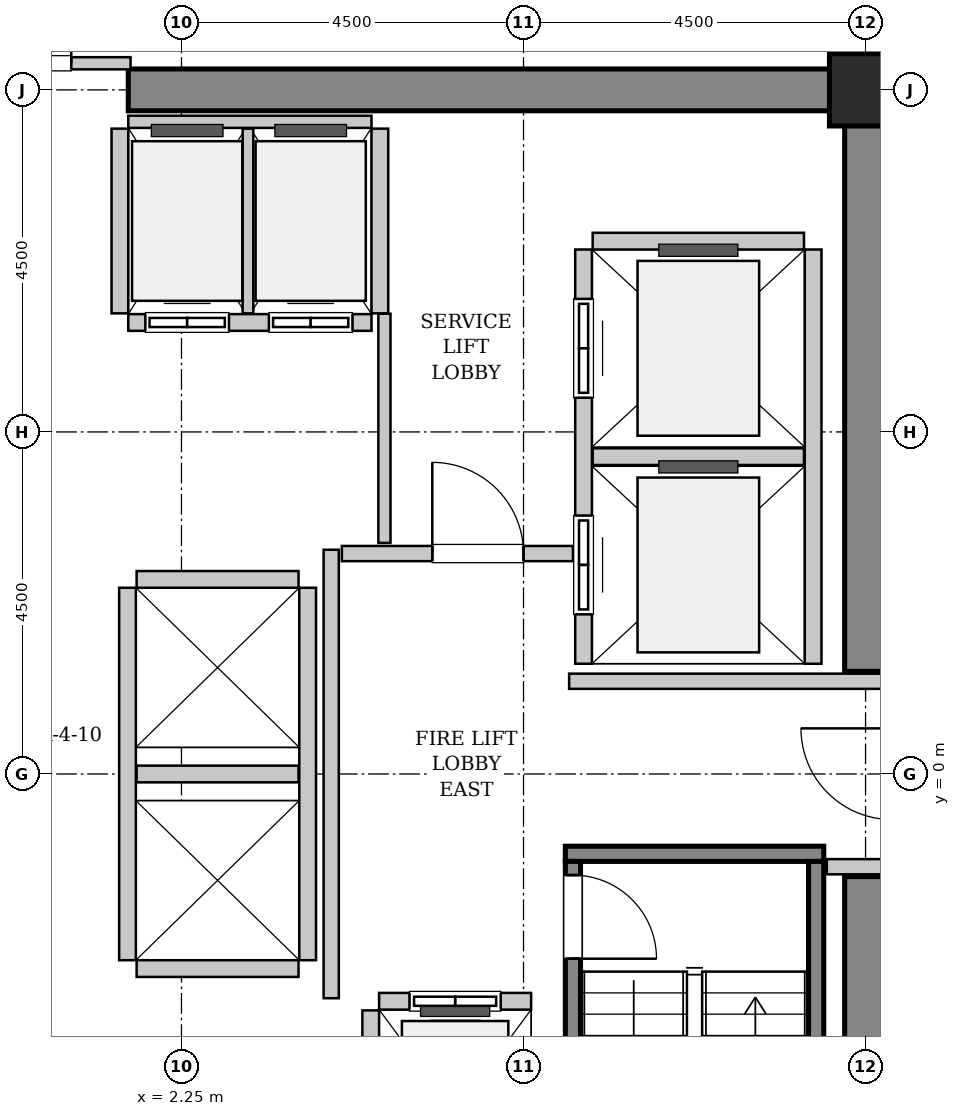
"""IFC4 building model, lengths in metres.
Left out: names, types, materials, properties, quantities, classifications, styles, units other than length and angle.
Written with IfcOpenShell. Run it as: python <this file> out.ifc"""

import sys

from ifc_helpers import new_model, si_unit, direction, frame, frame_2d, origin, origin_2d, place, context, subcontext, project, spatial, rectangle, hollow_rectangle, extrude, source, transform, mapped, element, fill, save


model = new_model("IFC4")
c1 = context("Model", 3, precision=1e-05, world=origin(), true_north=direction((0.0, 1.0)))
c2 = subcontext(c1, "Body", "Model", "MODEL_VIEW")
j1 = project(units=[si_unit("LENGTHUNIT", "METRE"), si_unit("PLANEANGLEUNIT", "RADIAN")], contexts=[c1])
p1 = place(None, origin())
s1 = spatial("IfcSite", under=j1, at=p1, CompositionType="ELEMENT")
p2 = place(p1, origin())
s2 = spatial("IfcBuilding", under=s1, at=p2, CompositionType="ELEMENT")
p3 = place(p2, frame((0.0, 0.0, 113.6)))
s3 = spatial("IfcBuildingStorey", under=s2, at=p3, CompositionType="ELEMENT", Elevation=113.6)
m1 = source(origin(), c2, "Body", "SweptSolid", [
    extrude(rectangle(XDim=9.975, YDim=0.55, at=frame_2d((4.987, 0.0))), origin(), (0.0, 0.0, 1.0), 3.8),
])
p4 = place(p3, frame((1.55, 9.0, 0.0), z_axis=(0.0, 0.0, 1.0), x_axis=(1.0, 0.0, 0.0)))
e1 = element("IfcWall", 1, at=p4, inside=s3, PredefinedType="SHEAR", context=c2, shape_type="MappedRepresentation", body=[
    mapped(m1, transform((0.0, 0.0, 0.0), x_axis=(1.0, 0.0, 0.0), y_axis=(0.0, 1.0, 0.0), z_axis=(0.0, 0.0, 1.0), scale=1.0)),
])
m2 = source(origin(), c2, "Body", "SweptSolid", [
    extrude(rectangle(XDim=7.375, YDim=0.55, at=frame_2d((3.688, 0.0))), origin(), (0.0, 0.0, 1.0), 3.8),
])
for number, where, z_axis, x_axis in (
    (2, (11.25, -8.725, 0.0), (0.0, 0.0, 1.0), (0.0, 1.0, 0.0)),
    (3, (11.25, 1.35, 0.0), (0.0, 0.0, 1.0), (0.0, 1.0, 0.0)),
):
    element("IfcWall", number, at=place(p3, frame(where, z_axis=z_axis, x_axis=x_axis)), inside=s3, PredefinedType="SHEAR", context=c2, shape_type="MappedRepresentation", body=[
        mapped(m2, transform((0.0, 0.0, 0.0), x_axis=(1.0, 0.0, 0.0), y_axis=(0.0, 1.0, 0.0), z_axis=(0.0, 0.0, 1.0), scale=1.0)),
    ])
m3 = source(origin(), c2, "Body", "SweptSolid", [
    extrude(hollow_rectangle(XDim=0.95, YDim=0.95, WallThickness=0.045, InnerFilletRadius=0.045, OuterFilletRadius=0.09, at=origin_2d()), origin(), (0.0, 0.0, 1.0), 3.8),
])
p5 = place(p3, frame((11.25, 9.0, 0.0), z_axis=(0.0, 0.0, 1.0), x_axis=(1.0, 0.0, 0.0)))
e4 = element("IfcColumn", 4, at=p5, inside=s3, PredefinedType="COLUMN", context=c2, shape_type="MappedRepresentation", body=[
    mapped(m3, transform((0.0, 0.0, 0.0), x_axis=(1.0, 0.0, 0.0), y_axis=(0.0, 1.0, 0.0), z_axis=(0.0, 0.0, 1.0), scale=1.0)),
])
m4 = source(origin(), c2, "Body", "SweptSolid", [
    extrude(rectangle(XDim=3.4, YDim=0.2, at=frame_2d((1.7, 0.0))), origin(), (0.0, 0.0, 1.0), 3.8),
])
p6 = place(p3, frame((7.3, -1.05, 0.0), z_axis=(0.0, 0.0, 1.0), x_axis=(1.0, 0.0, 0.0)))
e5 = element("IfcWall", 5, at=p6, inside=s3, PredefinedType="SOLIDWALL", context=c2, shape_type="MappedRepresentation", body=[
    mapped(m4, transform((0.0, 0.0, 0.0), x_axis=(1.0, 0.0, 0.0), y_axis=(0.0, 1.0, 0.0), z_axis=(0.0, 0.0, 1.0), scale=1.0)),
])
m5 = source(origin(), c2, "Body", "SweptSolid", [
    extrude(rectangle(XDim=7.1, YDim=0.2, at=frame_2d((3.55, 0.0))), origin(), (0.0, 0.0, 1.0), 3.8),
])
p7 = place(p3, frame((7.4, -1.15, 0.0), z_axis=(0.0, 0.0, 1.0), x_axis=(0.0, -1.0, 0.0)))
e6 = element("IfcWall", 6, at=p7, inside=s3, PredefinedType="SOLIDWALL", context=c2, shape_type="MappedRepresentation", body=[
    mapped(m5, transform((0.0, 0.0, 0.0), x_axis=(1.0, 0.0, 0.0), y_axis=(0.0, 1.0, 0.0), z_axis=(0.0, 0.0, 1.0), scale=1.0)),
])
p8 = place(p7, frame((0.18, 0.0, 0.0)))
e7 = element("IfcOpeningElement", 7, at=p8, cuts=e6, PredefinedType="OPENING", context=c2, shape_type="SweptSolid", body=[
    extrude(rectangle(XDim=1.1, YDim=2.15, at=frame_2d((0.55, 1.075))), frame((0.0, 0.11, 0.0), z_axis=(0.0, -1.0, 0.0), x_axis=(1.0, 0.0, 0.0)), (0.0, 0.0, 1.0), 0.22),
])
p9 = place(p3, frame((10.6, -1.15, 0.0), z_axis=(0.0, 0.0, 1.0), x_axis=(0.0, -1.0, 0.0)))
e8 = element("IfcWall", 8, at=p9, inside=s3, PredefinedType="SOLIDWALL", context=c2, shape_type="MappedRepresentation", body=[
    mapped(m5, transform((0.0, 0.0, 0.0), x_axis=(1.0, 0.0, 0.0), y_axis=(0.0, 1.0, 0.0), z_axis=(0.0, 0.0, 1.0), scale=1.0)),
])
m6 = source(origin(), c2, "Body", "SweptSolid", [
    extrude(rectangle(XDim=2.0, YDim=0.22, at=frame_2d((1.0, 0.0))), origin(), (0.0, 0.0, 1.0), 3.535),
])
p10 = place(p3, frame((6.85, -2.99, 0.0), z_axis=(0.0, 0.0, 1.0), x_axis=(-1.0, 0.0, 0.0)))
e9 = element("IfcWall", 9, at=p10, inside=s3, PredefinedType="SOLIDWALL", context=c2, shape_type="MappedRepresentation", body=[
    mapped(m6, transform((0.0, 0.0, 0.0), x_axis=(1.0, 0.0, 0.0), y_axis=(0.0, 1.0, 0.0), z_axis=(0.0, 0.0, 1.0), scale=1.0)),
])
p11 = place(p10, frame((0.4, 0.0, 0.0)))
e10 = element("IfcOpeningElement", 10, at=p11, cuts=e9, PredefinedType="OPENING", context=c2, shape_type="SweptSolid", body=[
    extrude(rectangle(XDim=1.2, YDim=2.2, at=frame_2d((0.6, 1.1))), frame((0.0, 0.12, 0.0), z_axis=(0.0, -1.0, 0.0), x_axis=(1.0, 0.0, 0.0)), (0.0, 0.0, 1.0), 0.24),
])
m7 = source(origin(), c2, "Body", "SweptSolid", [
    extrude(rectangle(XDim=2.68, YDim=0.22, at=frame_2d((1.34, 0.0))), origin(), (0.0, 0.0, 1.0), 3.535),
])
p12 = place(p3, frame((4.74, -3.11, 0.0), z_axis=(0.0, 0.0, 1.0), x_axis=(0.0, -1.0, 0.0)))
e11 = element("IfcWall", 11, at=p12, inside=s3, PredefinedType="SOLIDWALL", context=c2, shape_type="MappedRepresentation", body=[
    mapped(m7, transform((0.0, 0.0, 0.0), x_axis=(1.0, 0.0, 0.0), y_axis=(0.0, 1.0, 0.0), z_axis=(0.0, 0.0, 1.0), scale=1.0)),
])
m8 = source(origin(), c2, "Body", "SweptSolid", [
    extrude(rectangle(XDim=5.45, YDim=0.22, at=frame_2d((2.725, 0.0))), origin(), (0.0, 0.0, 1.0), 3.535),
])
p13 = place(p3, frame((7.54, 6.9, 0.0), z_axis=(0.0, 0.0, 1.0), x_axis=(0.0, -1.0, 0.0)))
e12 = element("IfcWall", 12, at=p13, inside=s3, PredefinedType="SOLIDWALL", context=c2, shape_type="MappedRepresentation", body=[
    mapped(m8, transform((0.0, 0.0, 0.0), x_axis=(1.0, 0.0, 0.0), y_axis=(0.0, 1.0, 0.0), z_axis=(0.0, 0.0, 1.0), scale=1.0)),
])
p14 = place(p13, frame((3.5, 0.0, 0.0)))
e13 = element("IfcOpeningElement", 13, at=p14, cuts=e12, PredefinedType="OPENING", context=c2, shape_type="SweptSolid", body=[
    extrude(rectangle(XDim=1.3, YDim=2.3, at=frame_2d((0.65, 1.15))), frame((0.0, 0.12, 0.0), z_axis=(0.0, -1.0, 0.0), x_axis=(1.0, 0.0, 0.0)), (0.0, 0.0, 1.0), 0.24),
])
p15 = place(p13, frame((0.65, 0.0, 0.0)))
e14 = element("IfcOpeningElement", 14, at=p15, cuts=e12, PredefinedType="OPENING", context=c2, shape_type="SweptSolid", body=[
    extrude(rectangle(XDim=1.3, YDim=2.3, at=frame_2d((0.65, 1.15))), frame((0.0, 0.12, 0.0), z_axis=(0.0, -1.0, 0.0), x_axis=(1.0, 0.0, 0.0)), (0.0, 0.0, 1.0), 0.24),
])
p16 = place(p3, frame((10.56, 1.45, 0.0), z_axis=(0.0, 0.0, 1.0), x_axis=(0.0, 1.0, 0.0)))
e15 = element("IfcWall", 15, at=p16, inside=s3, PredefinedType="SOLIDWALL", context=c2, shape_type="MappedRepresentation", body=[
    mapped(m8, transform((0.0, 0.0, 0.0), x_axis=(1.0, 0.0, 0.0), y_axis=(0.0, 1.0, 0.0), z_axis=(0.0, 0.0, 1.0), scale=1.0)),
])
m9 = source(origin(), c2, "Body", "SweptSolid", [
    extrude(rectangle(XDim=2.78, YDim=0.22, at=frame_2d((1.39, 0.0))), origin(), (0.0, 0.0, 1.0), 3.535),
])
for number, where, z_axis, x_axis in (
    (16, (7.66, 4.175, 0.0), (0.0, 0.0, 1.0), (1.0, 0.0, 0.0)),
    (17, (10.44, 7.01, 0.0), (0.0, 0.0, 1.0), (-1.0, 0.0, 0.0)),
):
    element("IfcWall", number, at=place(p3, frame(where, z_axis=z_axis, x_axis=x_axis)), inside=s3, PredefinedType="SOLIDWALL", context=c2, shape_type="MappedRepresentation", body=[
        mapped(m9, transform((0.0, 0.0, 0.0), x_axis=(1.0, 0.0, 0.0), y_axis=(0.0, 1.0, 0.0), z_axis=(0.0, 0.0, 1.0), scale=1.0)),
    ])
m10 = source(origin(), c2, "Body", "SweptSolid", [
    extrude(rectangle(XDim=3.2, YDim=0.22, at=frame_2d((1.6, 0.0))), origin(), (0.0, 0.0, 1.0), 3.535),
])
p17 = place(p3, frame((1.55, 5.94, 0.0), z_axis=(0.0, 0.0, 1.0), x_axis=(1.0, 0.0, 0.0)))
e18 = element("IfcWall", 18, at=p17, inside=s3, PredefinedType="SOLIDWALL", context=c2, shape_type="MappedRepresentation", body=[
    mapped(m10, transform((0.0, 0.0, 0.0), x_axis=(1.0, 0.0, 0.0), y_axis=(0.0, 1.0, 0.0), z_axis=(0.0, 0.0, 1.0), scale=1.0)),
])
p18 = place(p17, frame((0.225, 0.0, 0.0)))
e19 = element("IfcOpeningElement", 19, at=p18, cuts=e18, PredefinedType="OPENING", context=c2, shape_type="SweptSolid", body=[
    extrude(rectangle(XDim=1.1, YDim=2.2, at=frame_2d((0.55, 1.1))), frame((0.0, 0.12, 0.0), z_axis=(0.0, -1.0, 0.0), x_axis=(1.0, 0.0, 0.0)), (0.0, 0.0, 1.0), 0.24),
])
p19 = place(p17, frame((1.85, 0.0, 0.0)))
e20 = element("IfcOpeningElement", 20, at=p19, cuts=e18, PredefinedType="OPENING", context=c2, shape_type="SweptSolid", body=[
    extrude(rectangle(XDim=1.1, YDim=2.2, at=frame_2d((0.55, 1.1))), frame((0.0, 0.12, 0.0), z_axis=(0.0, -1.0, 0.0), x_axis=(1.0, 0.0, 0.0)), (0.0, 0.0, 1.0), 0.24),
])
m11 = source(origin(), c2, "Body", "SweptSolid", [
    extrude(rectangle(XDim=3.2, YDim=0.16, at=frame_2d((1.6, 0.0))), origin(), (0.0, 0.0, 1.0), 2.425),
])
p20 = place(p3, frame((4.75, 8.58, 0.0), z_axis=(0.0, 0.0, 1.0), x_axis=(-1.0, 0.0, 0.0)))
e21 = element("IfcWall", 21, at=p20, inside=s3, PredefinedType="PARTITIONING", context=c2, shape_type="MappedRepresentation", body=[
    mapped(m11, transform((0.0, 0.0, 0.0), x_axis=(1.0, 0.0, 0.0), y_axis=(0.0, 1.0, 0.0), z_axis=(0.0, 0.0, 1.0), scale=1.0)),
])
m12 = source(origin(), c2, "Body", "SweptSolid", [
    extrude(rectangle(XDim=2.43, YDim=0.22, at=frame_2d((1.215, 0.0))), origin(), (0.0, 0.0, 1.0), 3.535),
])
p21 = place(p3, frame((1.44, 8.49, 0.0), z_axis=(0.0, 0.0, 1.0), x_axis=(0.0, -1.0, 0.0)))
e22 = element("IfcWall", 22, at=p21, inside=s3, PredefinedType="SOLIDWALL", context=c2, shape_type="MappedRepresentation", body=[
    mapped(m12, transform((0.0, 0.0, 0.0), x_axis=(1.0, 0.0, 0.0), y_axis=(0.0, 1.0, 0.0), z_axis=(0.0, 0.0, 1.0), scale=1.0)),
])
m13 = source(origin(), c2, "Body", "SweptSolid", [
    extrude(rectangle(XDim=2.43, YDim=0.14, at=frame_2d((1.215, 0.0))), origin(), (0.0, 0.0, 1.0), 3.535),
])
p22 = place(p3, frame((3.125, 6.06, 0.0), z_axis=(0.0, 0.0, 1.0), x_axis=(0.0, 1.0, 0.0)))
e23 = element("IfcWall", 23, at=p22, inside=s3, PredefinedType="PARTITIONING", context=c2, shape_type="MappedRepresentation", body=[
    mapped(m13, transform((0.0, 0.0, 0.0), x_axis=(1.0, 0.0, 0.0), y_axis=(0.0, 1.0, 0.0), z_axis=(0.0, 0.0, 1.0), scale=1.0)),
])
p23 = place(p3, frame((4.86, 6.06, 0.0), z_axis=(0.0, 0.0, 1.0), x_axis=(0.0, 1.0, 0.0)))
e24 = element("IfcWall", 24, at=p23, inside=s3, PredefinedType="SOLIDWALL", context=c2, shape_type="MappedRepresentation", body=[
    mapped(m12, transform((0.0, 0.0, 0.0), x_axis=(1.0, 0.0, 0.0), y_axis=(0.0, 1.0, 0.0), z_axis=(0.0, 0.0, 1.0), scale=1.0)),
])
m14 = source(origin(), c2, "Body", "SweptSolid", [
    extrude(rectangle(XDim=4.9, YDim=0.22, at=frame_2d((2.45, 0.0))), origin(), (0.0, 0.0, 1.0), 3.535),
])
for number, where, z_axis, x_axis in (
    (25, (1.54, 2.45, 0.0), (0.0, 0.0, 1.0), (0.0, -1.0, 0.0)),
    (26, (3.91, -2.45, 0.0), (0.0, 0.0, 1.0), (0.0, 1.0, 0.0)),
):
    element("IfcWall", number, at=place(p3, frame(where, z_axis=z_axis, x_axis=x_axis)), inside=s3, PredefinedType="SOLIDWALL", context=c2, shape_type="MappedRepresentation", body=[
        mapped(m14, transform((0.0, 0.0, 0.0), x_axis=(1.0, 0.0, 0.0), y_axis=(0.0, 1.0, 0.0), z_axis=(0.0, 0.0, 1.0), scale=1.0)),
    ])
m15 = source(origin(), c2, "Body", "SweptSolid", [
    extrude(rectangle(XDim=2.13, YDim=0.22, at=frame_2d((1.065, 0.0))), origin(), (0.0, 0.0, 1.0), 3.535),
])
for number, where, z_axis, x_axis in (
    (27, (1.66, -2.56, 0.0), (0.0, 0.0, 1.0), (1.0, 0.0, 0.0)),
    (28, (1.66, 0.0, 0.0), (0.0, 0.0, 1.0), (1.0, 0.0, 0.0)),
    (29, (3.79, 2.56, 0.0), (0.0, 0.0, 1.0), (-1.0, 0.0, 0.0)),
):
    element("IfcWall", number, at=place(p3, frame(where, z_axis=z_axis, x_axis=x_axis)), inside=s3, PredefinedType="SOLIDWALL", context=c2, shape_type="MappedRepresentation", body=[
        mapped(m15, transform((0.0, 0.0, 0.0), x_axis=(1.0, 0.0, 0.0), y_axis=(0.0, 1.0, 0.0), z_axis=(0.0, 0.0, 1.0), scale=1.0)),
    ])
m16 = source(origin(), c2, "Body", "SweptSolid", [
    extrude(rectangle(XDim=5.9, YDim=0.2, at=frame_2d((2.95, 0.0))), origin(), (0.0, 0.0, 1.0), 3.535),
])
p24 = place(p3, frame((4.22, -2.95, 0.0), z_axis=(0.0, 0.0, 1.0), x_axis=(0.0, 1.0, 0.0)))
e30 = element("IfcWall", 30, at=p24, inside=s3, PredefinedType="PARTITIONING", context=c2, shape_type="MappedRepresentation", body=[
    mapped(m16, transform((0.0, 0.0, 0.0), x_axis=(1.0, 0.0, 0.0), y_axis=(0.0, 1.0, 0.0), z_axis=(0.0, 0.0, 1.0), scale=1.0)),
])
m17 = source(origin(), c2, "Body", "SweptSolid", [
    extrude(rectangle(XDim=3.04, YDim=0.2, at=frame_2d((1.52, 0.0))), origin(), (0.0, 0.0, 1.0), 3.535),
])
p25 = place(p3, frame((4.36, 2.9, 0.0), z_axis=(0.0, 0.0, 1.0), x_axis=(1.0, 0.0, 0.0)))
e31 = element("IfcWall", 31, at=p25, inside=s3, PredefinedType="PARTITIONING", context=c2, shape_type="MappedRepresentation", body=[
    mapped(m17, transform((0.0, 0.0, 0.0), x_axis=(1.0, 0.0, 0.0), y_axis=(0.0, 1.0, 0.0), z_axis=(0.0, 0.0, 1.0), scale=1.0)),
])
p26 = place(p25, frame((1.19, 0.0, 0.0)))
e32 = element("IfcOpeningElement", 32, at=p26, cuts=e31, PredefinedType="OPENING", context=c2, shape_type="SweptSolid", body=[
    extrude(rectangle(XDim=1.2, YDim=2.15, at=frame_2d((0.6, 1.075))), frame((0.0, 0.11, 0.0), z_axis=(0.0, -1.0, 0.0), x_axis=(1.0, 0.0, 0.0)), (0.0, 0.0, 1.0), 0.22),
])
m18 = source(origin(), c2, "Body", "SweptSolid", [
    extrude(rectangle(XDim=4.11, YDim=0.2, at=frame_2d((2.055, 0.0))), origin(), (0.0, 0.0, 1.0), 3.535),
])
p27 = place(p3, frame((7.35, 1.22, 0.0), z_axis=(0.0, 0.0, 1.0), x_axis=(1.0, 0.0, 0.0)))
e33 = element("IfcWall", 33, at=p27, inside=s3, PredefinedType="PARTITIONING", context=c2, shape_type="MappedRepresentation", body=[
    mapped(m18, transform((0.0, 0.0, 0.0), x_axis=(1.0, 0.0, 0.0), y_axis=(0.0, 1.0, 0.0), z_axis=(0.0, 0.0, 1.0), scale=1.0)),
])
m19 = source(origin(), c2, "Body", "SweptSolid", [
    extrude(rectangle(XDim=0.72, YDim=0.2, at=frame_2d((0.36, 0.0))), origin(), (0.0, 0.0, 1.0), 3.535),
])
p28 = place(p3, frame((10.74, -1.22, 0.0), z_axis=(0.0, 0.0, 1.0), x_axis=(1.0, 0.0, 0.0)))
e34 = element("IfcWall", 34, at=p28, inside=s3, PredefinedType="PARTITIONING", context=c2, shape_type="MappedRepresentation", body=[
    mapped(m19, transform((0.0, 0.0, 0.0), x_axis=(1.0, 0.0, 0.0), y_axis=(0.0, 1.0, 0.0), z_axis=(0.0, 0.0, 1.0), scale=1.0)),
])
m20 = source(origin(), c2, "Body", "SweptSolid", [
    extrude(rectangle(XDim=3.16, YDim=0.16, at=frame_2d((1.58, 0.0))), origin(), (0.0, 0.0, 1.0), 2.425),
])
p29 = place(p3, frame((-1.58, 9.35, 0.0), z_axis=(0.0, 0.0, 1.0), x_axis=(1.0, 0.0, 0.0)))
e35 = element("IfcWall", 35, at=p29, inside=s3, PredefinedType="PARTITIONING", context=c2, shape_type="MappedRepresentation", body=[
    mapped(m20, transform((0.0, 0.0, 0.0), x_axis=(1.0, 0.0, 0.0), y_axis=(0.0, 1.0, 0.0), z_axis=(0.0, 0.0, 1.0), scale=1.0)),
])
p30 = place(p29, frame((0.78, 0.0, 0.0)))
e36 = element("IfcOpeningElement", 36, at=p30, cuts=e35, PredefinedType="OPENING", context=c2, shape_type="SweptSolid", body=[
    extrude(rectangle(XDim=1.6, YDim=2.3, at=frame_2d((0.8, 1.15))), frame((0.0, 0.09, 0.0), z_axis=(0.0, -1.0, 0.0), x_axis=(1.0, 0.0, 0.0)), (0.0, 0.0, 1.0), 0.18),
])
m21 = source(origin(), c2, "Body", "SweptSolid", [
    extrude(rectangle(XDim=3.015, YDim=0.16, at=frame_2d((1.507, 0.0))), origin(), (0.0, 0.0, 1.0), 3.535),
])
p31 = place(p3, frame((4.92, 3.04, 0.0), z_axis=(0.0, 0.0, 1.0), x_axis=(0.0, 1.0, 0.0)))
e37 = element("IfcWall", 37, at=p31, inside=s3, PredefinedType="PARTITIONING", context=c2, shape_type="MappedRepresentation", body=[
    mapped(m21, transform((0.0, 0.0, 0.0), x_axis=(1.0, 0.0, 0.0), y_axis=(0.0, 1.0, 0.0), z_axis=(0.0, 0.0, 1.0), scale=1.0)),
])
m22 = source(origin(), c2, "Body", "SweptSolid", [
    extrude(rectangle(XDim=1.1, YDim=2.15, at=frame_2d((0.55, 1.075))), frame((0.0, 0.025, 0.0), z_axis=(0.0, -1.0, 0.0), x_axis=(1.0, 0.0, 0.0)), (0.0, 0.0, 1.0), 0.05),
])
p32 = place(p8, origin())
e38 = element("IfcDoor", 38, at=p32, inside=s3, OperationType="SINGLE_SWING_RIGHT", PredefinedType="DOOR", context=c2, shape_type="MappedRepresentation", body=[
    mapped(m22, transform((0.0, 0.0, 0.0), x_axis=(1.0, 0.0, 0.0), y_axis=(0.0, 1.0, 0.0), z_axis=(0.0, 0.0, 1.0), scale=1.0)),
])
fill(e7, e38)
m23 = source(origin(), c2, "Body", "SweptSolid", [
    extrude(rectangle(XDim=1.2, YDim=2.2, at=frame_2d((0.6, 1.1))), frame((0.0, 0.025, 0.0), z_axis=(0.0, -1.0, 0.0), x_axis=(1.0, 0.0, 0.0)), (0.0, 0.0, 1.0), 0.05),
])
p33 = place(p11, origin())
e39 = element("IfcDoor", 39, at=p33, inside=s3, OperationType="SLIDING_TO_LEFT", PredefinedType="DOOR", context=c2, shape_type="MappedRepresentation", body=[
    mapped(m23, transform((0.0, 0.0, 0.0), x_axis=(1.0, 0.0, 0.0), y_axis=(0.0, 1.0, 0.0), z_axis=(0.0, 0.0, 1.0), scale=1.0)),
])
fill(e10, e39)
m24 = source(origin(), c2, "Body", "SweptSolid", [
    extrude(rectangle(XDim=1.3, YDim=2.3, at=frame_2d((0.65, 1.15))), frame((0.0, 0.025, 0.0), z_axis=(0.0, -1.0, 0.0), x_axis=(1.0, 0.0, 0.0)), (0.0, 0.0, 1.0), 0.05),
])
p34 = place(p14, origin())
e40 = element("IfcDoor", 40, at=p34, inside=s3, OperationType="SLIDING_TO_RIGHT", PredefinedType="DOOR", context=c2, shape_type="MappedRepresentation", body=[
    mapped(m24, transform((0.0, 0.0, 0.0), x_axis=(1.0, 0.0, 0.0), y_axis=(0.0, 1.0, 0.0), z_axis=(0.0, 0.0, 1.0), scale=1.0)),
])
fill(e13, e40)
p35 = place(p15, origin())
e41 = element("IfcDoor", 41, at=p35, inside=s3, OperationType="SLIDING_TO_RIGHT", PredefinedType="DOOR", context=c2, shape_type="MappedRepresentation", body=[
    mapped(m24, transform((0.0, 0.0, 0.0), x_axis=(1.0, 0.0, 0.0), y_axis=(0.0, 1.0, 0.0), z_axis=(0.0, 0.0, 1.0), scale=1.0)),
])
fill(e14, e41)
m25 = source(origin(), c2, "Body", "SweptSolid", [
    extrude(rectangle(XDim=1.1, YDim=2.2, at=frame_2d((0.55, 1.1))), frame((0.0, 0.025, 0.0), z_axis=(0.0, -1.0, 0.0), x_axis=(1.0, 0.0, 0.0)), (0.0, 0.0, 1.0), 0.05),
])
p36 = place(p18, origin())
e42 = element("IfcDoor", 42, at=p36, inside=s3, OperationType="DOUBLE_DOOR_SLIDING", PredefinedType="DOOR", context=c2, shape_type="MappedRepresentation", body=[
    mapped(m25, transform((0.0, 0.0, 0.0), x_axis=(1.0, 0.0, 0.0), y_axis=(0.0, 1.0, 0.0), z_axis=(0.0, 0.0, 1.0), scale=1.0)),
])
fill(e19, e42)
p37 = place(p19, origin())
e43 = element("IfcDoor", 43, at=p37, inside=s3, OperationType="DOUBLE_DOOR_SLIDING", PredefinedType="DOOR", context=c2, shape_type="MappedRepresentation", body=[
    mapped(m25, transform((0.0, 0.0, 0.0), x_axis=(1.0, 0.0, 0.0), y_axis=(0.0, 1.0, 0.0), z_axis=(0.0, 0.0, 1.0), scale=1.0)),
])
fill(e20, e43)
m26 = source(origin(), c2, "Body", "SweptSolid", [
    extrude(rectangle(XDim=1.2, YDim=2.15, at=frame_2d((0.6, 1.075))), frame((0.0, 0.025, 0.0), z_axis=(0.0, -1.0, 0.0), x_axis=(1.0, 0.0, 0.0)), (0.0, 0.0, 1.0), 0.05),
])
p38 = place(p26, origin())
e44 = element("IfcDoor", 44, at=p38, inside=s3, OperationType="SINGLE_SWING_LEFT", PredefinedType="DOOR", context=c2, shape_type="MappedRepresentation", body=[
    mapped(m26, transform((0.0, 0.0, 0.0), x_axis=(1.0, 0.0, 0.0), y_axis=(0.0, 1.0, 0.0), z_axis=(0.0, 0.0, 1.0), scale=1.0)),
])
fill(e32, e44)
m27 = source(origin(), c2, "Body", "SweptSolid", [
    extrude(rectangle(XDim=1.6, YDim=2.3, at=frame_2d((0.8, 1.15))), frame((0.0, 0.025, 0.0), z_axis=(0.0, -1.0, 0.0), x_axis=(1.0, 0.0, 0.0)), (0.0, 0.0, 1.0), 0.05),
])
p39 = place(p30, origin())
e45 = element("IfcDoor", 45, at=p39, inside=s3, OperationType="DOUBLE_DOOR_SINGLE_SWING", PredefinedType="DOOR", context=c2, shape_type="MappedRepresentation", body=[
    mapped(m27, transform((0.0, 0.0, 0.0), x_axis=(1.0, 0.0, 0.0), y_axis=(0.0, 1.0, 0.0), z_axis=(0.0, 0.0, 1.0), scale=1.0)),
])
fill(e36, e45)
save(model, sys.argv[1])
